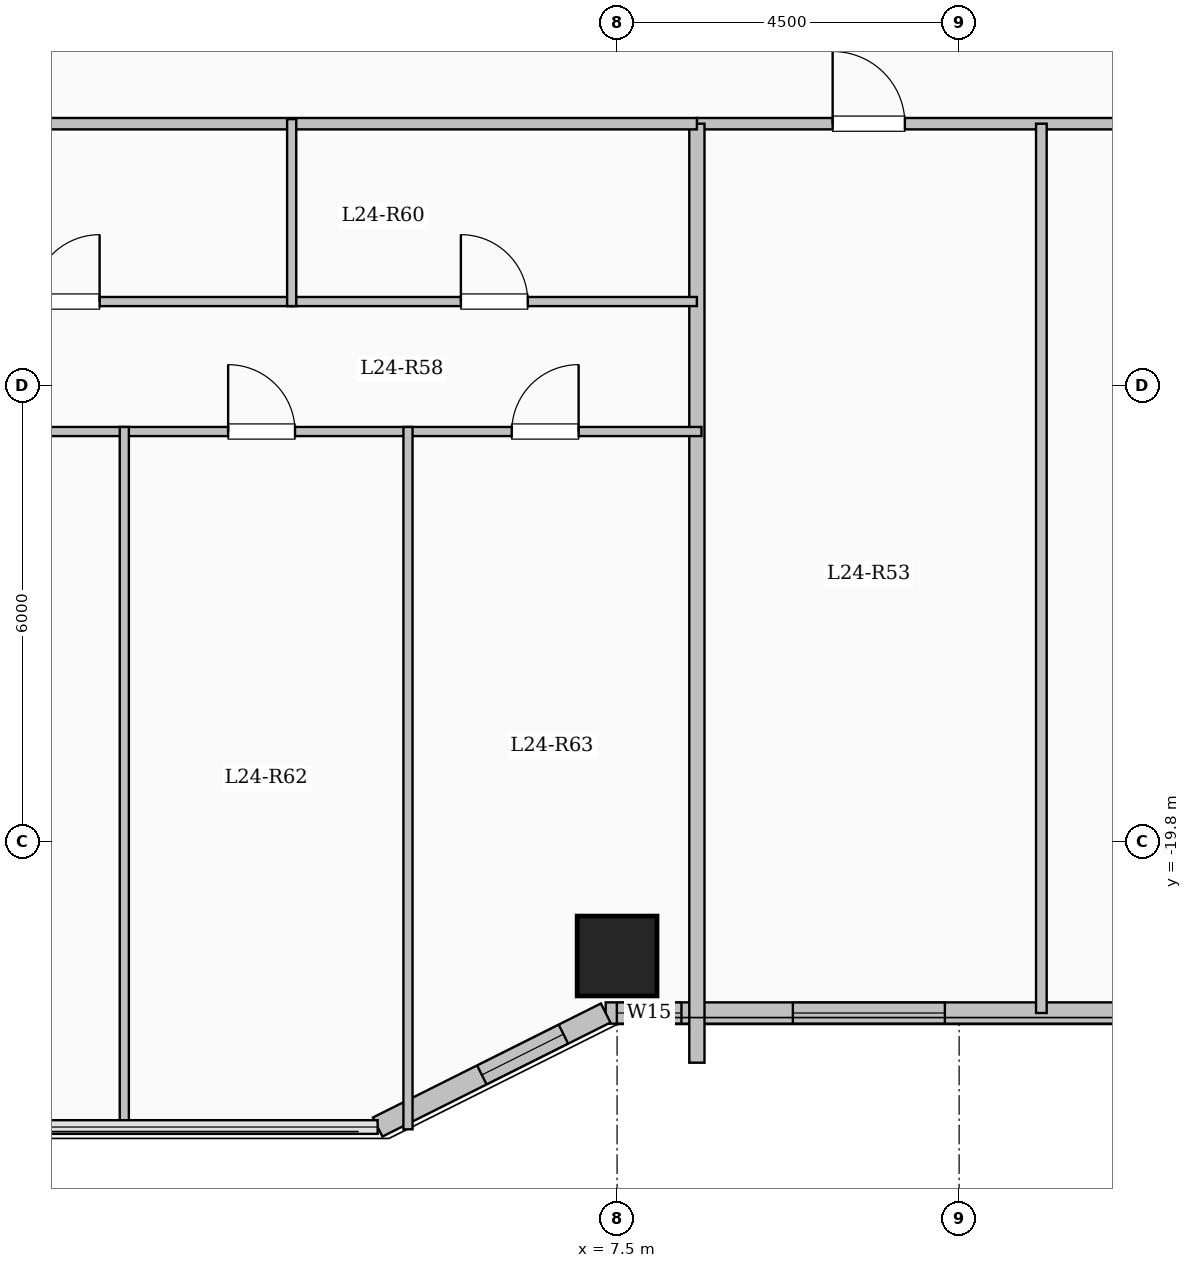
"""IFC4 building model, lengths in metres.
Left out: names, types, materials, properties, quantities, classifications, styles, units other than length and angle.
Written with IfcOpenShell. Run it as: python <this file> out.ifc"""

import sys

from ifc_helpers import new_model, si_unit, direction, frame, frame_2d, origin, origin_2d, place, context, subcontext, project, spatial, rectangle, extrude, element, fill, save


model = new_model("IFC4")
c1 = context("Model", 3, precision=1e-05, world=origin(), true_north=direction((0.0, 1.0)))
c2 = subcontext(c1, "Body", "Model", "MODEL_VIEW")
j1 = project(units=[si_unit("LENGTHUNIT", "METRE"), si_unit("PLANEANGLEUNIT", "RADIAN")], contexts=[c1])
p1 = place(None, origin())
s1 = spatial("IfcSite", under=j1, at=p1, CompositionType="ELEMENT")
p2 = place(p1, origin())
s2 = spatial("IfcBuilding", under=s1, at=p2, CompositionType="ELEMENT")
p3 = place(p2, frame((0.0, 0.0, 91.7)))
s3 = spatial("IfcBuildingStorey", under=s2, at=p3, CompositionType="ELEMENT", Elevation=91.7)
p4 = place(p3, frame((7.5, -21.3, 0.0), z_axis=(0.0, 0.0, 1.0), x_axis=(1.0, 0.0, 0.0)))
e1 = element("IfcColumn", 1, at=p4, inside=s3, PredefinedType="COLUMN", context=c2, shape_type="SweptSolid", body=[
    extrude(rectangle(XDim=1.05, YDim=1.05, at=origin_2d()), origin(), (0.0, 0.0, 1.0), 3.35),
])
p5 = place(p3, frame((21.15, -22.05, 0.0), z_axis=(0.0, 0.0, 1.0), x_axis=(-1.0, 0.0, 0.0)))
e2 = element("IfcWall", 2, at=p5, inside=s3, PredefinedType="SOLIDWALL", context=c2, shape_type="SweptSolid", body=[
    extrude(rectangle(XDim=13.8, YDim=0.28, at=frame_2d((6.9, 0.0))), origin(), (0.0, 0.0, 1.0), 3.1),
])
p6 = place(p5, frame((0.906, 0.0, 0.9)))
e3 = element("IfcOpeningElement", 3, at=p6, cuts=e2, PredefinedType="OPENING", context=c2, shape_type="SweptSolid", body=[
    extrude(rectangle(XDim=1.8, YDim=1.65, at=frame_2d((0.9, 0.825))), frame((0.0, 0.15, 0.0), z_axis=(0.0, -1.0, 0.0), x_axis=(1.0, 0.0, 0.0)), (0.0, 0.0, 1.0), 0.3),
])
p7 = place(p5, frame((4.821, 0.0, 0.9)))
e4 = element("IfcOpeningElement", 4, at=p7, cuts=e2, PredefinedType="OPENING", context=c2, shape_type="SweptSolid", body=[
    extrude(rectangle(XDim=2.0, YDim=1.7, at=frame_2d((1.0, 0.85))), frame((0.0, 0.15, 0.0), z_axis=(0.0, -1.0, 0.0), x_axis=(1.0, 0.0, 0.0)), (0.0, 0.0, 1.0), 0.3),
])
p8 = place(p5, frame((9.337, 0.0, 0.9)))
e5 = element("IfcOpeningElement", 5, at=p8, cuts=e2, PredefinedType="OPENING", context=c2, shape_type="SweptSolid", body=[
    extrude(rectangle(XDim=2.0, YDim=1.7, at=frame_2d((1.0, 0.85))), frame((0.0, 0.15, 0.0), z_axis=(0.0, -1.0, 0.0), x_axis=(1.0, 0.0, 0.0)), (0.0, 0.0, 1.0), 0.3),
])
p9 = place(p5, frame((12.803, 0.0, 0.95)))
e6 = element("IfcOpeningElement", 6, at=p9, cuts=e2, PredefinedType="OPENING", context=c2, shape_type="SweptSolid", body=[
    extrude(rectangle(XDim=0.85, YDim=1.5, at=frame_2d((0.425, 0.75))), frame((0.0, 0.15, 0.0), z_axis=(0.0, -1.0, 0.0), x_axis=(1.0, 0.0, 0.0)), (0.0, 0.0, 1.0), 0.3),
])
p10 = place(p3, frame((7.35, -22.05, 0.0), z_axis=(0.0, 0.0, 1.0), x_axis=(-0.894427191, -0.4472135955, 0.0)))
e7 = element("IfcWall", 7, at=p10, inside=s3, PredefinedType="SOLIDWALL", context=c2, shape_type="SweptSolid", body=[
    extrude(rectangle(XDim=3.354, YDim=0.28, at=frame_2d((1.677, 0.0))), origin(), (0.0, 0.0, 1.0), 3.1),
])
p11 = place(p10, frame((0.622, 0.0, 0.95)))
e8 = element("IfcOpeningElement", 8, at=p11, cuts=e7, PredefinedType="OPENING", context=c2, shape_type="SweptSolid", body=[
    extrude(rectangle(XDim=1.2, YDim=1.5, at=frame_2d((0.6, 0.75))), frame((0.0, 0.15, 0.0), z_axis=(0.0, -1.0, 0.0), x_axis=(1.0, 0.0, 0.0)), (0.0, 0.0, 1.0), 0.3),
])
p12 = place(p3, frame((8.55, -10.35, 0.0), z_axis=(0.0, 0.0, 1.0), x_axis=(1.0, 0.0, 0.0)))
e9 = element("IfcWall", 9, at=p12, inside=s3, PredefinedType="PARTITIONING", context=c2, shape_type="SweptSolid", body=[
    extrude(rectangle(XDim=12.5, YDim=0.15, at=frame_2d((6.25, 0.0))), origin(), (0.0, 0.0, 1.0), 3.1),
])
p13 = place(p12, frame((1.786, 0.0, 0.0)))
e10 = element("IfcOpeningElement", 10, at=p13, cuts=e9, PredefinedType="OPENING", context=c2, shape_type="SweptSolid", body=[
    extrude(rectangle(XDim=0.95, YDim=2.15, at=frame_2d((0.475, 1.075))), frame((0.0, 0.085, 0.0), z_axis=(0.0, -1.0, 0.0), x_axis=(1.0, 0.0, 0.0)), (0.0, 0.0, 1.0), 0.17),
])
p14 = place(p12, frame((6.298, 0.0, 0.0)))
e11 = element("IfcOpeningElement", 11, at=p14, cuts=e9, PredefinedType="OPENING", context=c2, shape_type="SweptSolid", body=[
    extrude(rectangle(XDim=0.95, YDim=2.15, at=frame_2d((0.475, 1.075))), frame((0.0, 0.085, 0.0), z_axis=(0.0, -1.0, 0.0), x_axis=(1.0, 0.0, 0.0)), (0.0, 0.0, 1.0), 0.17),
])
p15 = place(p12, frame((10.312, 0.0, 0.0)))
e12 = element("IfcOpeningElement", 12, at=p15, cuts=e9, PredefinedType="OPENING", context=c2, shape_type="SweptSolid", body=[
    extrude(rectangle(XDim=0.95, YDim=2.15, at=frame_2d((0.475, 1.075))), frame((0.0, 0.085, 0.0), z_axis=(0.0, -1.0, 0.0), x_axis=(1.0, 0.0, 0.0)), (0.0, 0.0, 1.0), 0.17),
])
p16 = place(p3, frame((13.082, -22.05, 0.0), z_axis=(0.0, 0.0, 1.0), x_axis=(0.0, 1.0, 0.0)))
e13 = element("IfcWall", 13, at=p16, inside=s3, PredefinedType="PARTITIONING", context=c2, shape_type="SweptSolid", body=[
    extrude(rectangle(XDim=11.7, YDim=0.14, at=frame_2d((5.85, 0.0))), origin(), (0.0, 0.0, 1.0), 3.1),
])
p17 = place(p3, frame((8.55, -22.704, 0.0), z_axis=(0.0, 0.0, 1.0), x_axis=(0.0, 1.0, 0.0)))
e14 = element("IfcWall", 14, at=p17, inside=s3, PredefinedType="SOLIDWALL", context=c2, shape_type="SweptSolid", body=[
    extrude(rectangle(XDim=12.354, YDim=0.2, at=frame_2d((6.177, 0.0))), origin(), (0.0, 0.0, 1.0), 3.1),
])
p18 = place(p3, frame((-8.55, -10.35, 0.0), z_axis=(0.0, 0.0, 1.0), x_axis=(1.0, 0.0, 0.0)))
e15 = element("IfcWall", 15, at=p18, inside=s3, PredefinedType="PARTITIONING", context=c2, shape_type="SweptSolid", body=[
    extrude(rectangle(XDim=17.1, YDim=0.15, at=frame_2d((8.55, 0.0))), origin(), (0.0, 0.0, 1.0), 3.1),
])
p19 = place(p18, frame((1.6, 0.0, 0.0)))
e16 = element("IfcOpeningElement", 16, at=p19, cuts=e15, PredefinedType="OPENING", context=c2, shape_type="SweptSolid", body=[
    extrude(rectangle(XDim=0.96, YDim=2.15, at=frame_2d((0.48, 1.075))), frame((0.0, 0.085, 0.0), z_axis=(0.0, -1.0, 0.0), x_axis=(1.0, 0.0, 0.0)), (0.0, 0.0, 1.0), 0.17),
])
p20 = place(p3, frame((-2.714, -12.69, 0.0), z_axis=(0.0, 0.0, 1.0), x_axis=(1.0, 0.0, 0.0)))
e17 = element("IfcWall", 17, at=p20, inside=s3, PredefinedType="PARTITIONING", context=c2, shape_type="SweptSolid", body=[
    extrude(rectangle(XDim=5.933, YDim=0.12, at=frame_2d((2.967, 0.0))), origin(), (0.0, 0.0, 1.0), 2.635),
])
p21 = place(p20, frame((2.526, 0.0, 0.0)))
e18 = element("IfcOpeningElement", 18, at=p21, cuts=e17, PredefinedType="OPENING", context=c2, shape_type="SweptSolid", body=[
    extrude(rectangle(XDim=0.88, YDim=2.1, at=frame_2d((0.44, 1.05))), frame((0.0, 0.07, 0.0), z_axis=(0.0, -1.0, 0.0), x_axis=(1.0, 0.0, 0.0)), (0.0, 0.0, 1.0), 0.14),
])
p22 = place(p3, frame((3.219, -12.69, 0.0), z_axis=(0.0, 0.0, 1.0), x_axis=(1.0, 0.0, 0.0)))
e19 = element("IfcWall", 19, at=p22, inside=s3, PredefinedType="PARTITIONING", context=c2, shape_type="SweptSolid", body=[
    extrude(rectangle(XDim=5.331, YDim=0.12, at=frame_2d((2.666, 0.0))), origin(), (0.0, 0.0, 1.0), 2.635),
])
p23 = place(p22, frame((2.226, 0.0, 0.0)))
e20 = element("IfcOpeningElement", 20, at=p23, cuts=e19, PredefinedType="OPENING", context=c2, shape_type="SweptSolid", body=[
    extrude(rectangle(XDim=0.88, YDim=2.1, at=frame_2d((0.44, 1.05))), frame((0.0, 0.07, 0.0), z_axis=(0.0, -1.0, 0.0), x_axis=(1.0, 0.0, 0.0)), (0.0, 0.0, 1.0), 0.14),
])
p24 = place(p3, frame((-2.774, -14.4, 0.0), z_axis=(0.0, 0.0, 1.0), x_axis=(1.0, 0.0, 0.0)))
e21 = element("IfcWall", 21, at=p24, inside=s3, PredefinedType="PARTITIONING", context=c2, shape_type="SweptSolid", body=[
    extrude(rectangle(XDim=11.384, YDim=0.12, at=frame_2d((5.692, 0.0))), origin(), (0.0, 0.0, 1.0), 2.635),
])
p25 = place(p24, frame((1.426, 0.0, 0.0)))
e22 = element("IfcOpeningElement", 22, at=p25, cuts=e21, PredefinedType="OPENING", context=c2, shape_type="SweptSolid", body=[
    extrude(rectangle(XDim=0.88, YDim=2.1, at=frame_2d((0.44, 1.05))), frame((0.0, 0.07, 0.0), z_axis=(0.0, -1.0, 0.0), x_axis=(1.0, 0.0, 0.0)), (0.0, 0.0, 1.0), 0.14),
])
p26 = place(p24, frame((5.157, 0.0, 0.0)))
e23 = element("IfcOpeningElement", 23, at=p26, cuts=e21, PredefinedType="OPENING", context=c2, shape_type="SweptSolid", body=[
    extrude(rectangle(XDim=0.88, YDim=2.1, at=frame_2d((0.44, 1.05))), frame((0.0, 0.07, 0.0), z_axis=(0.0, -1.0, 0.0), x_axis=(1.0, 0.0, 0.0)), (0.0, 0.0, 1.0), 0.14),
])
p27 = place(p24, frame((8.888, 0.0, 0.0)))
e24 = element("IfcOpeningElement", 24, at=p27, cuts=e21, PredefinedType="OPENING", context=c2, shape_type="SweptSolid", body=[
    extrude(rectangle(XDim=0.88, YDim=2.1, at=frame_2d((0.44, 1.05))), frame((0.0, 0.07, 0.0), z_axis=(0.0, -1.0, 0.0), x_axis=(1.0, 0.0, 0.0)), (0.0, 0.0, 1.0), 0.14),
])
p28 = place(p3, frame((3.219, -12.75, 0.0), z_axis=(0.0, 0.0, 1.0), x_axis=(0.0, 1.0, 0.0)))
e25 = element("IfcWall", 25, at=p28, inside=s3, PredefinedType="PARTITIONING", context=c2, shape_type="SweptSolid", body=[
    extrude(rectangle(XDim=2.46, YDim=0.12, at=frame_2d((1.23, 0.0))), origin(), (0.0, 0.0, 1.0), 3.1),
])
for number, where, z_axis, x_axis in (
    (26, (1.017, -23.58, 0.0), (0.0, 0.0, 1.0), (0.0, 1.0, 0.0)),
    (27, (4.749, -23.58, 0.0), (0.0, 0.0, 1.0), (0.0, 1.0, 0.0)),
):
    element("IfcWall", number, at=place(p3, frame(where, z_axis=z_axis, x_axis=x_axis)), inside=s3, PredefinedType="PARTITIONING", context=c2, shape_type="SweptSolid", body=[
        extrude(rectangle(XDim=9.24, YDim=0.12, at=frame_2d((4.62, 0.0))), origin(), (0.0, 0.0, 1.0), 3.1),
    ])
p29 = place(p8, origin())
e28 = element("IfcWindow", 28, at=p29, inside=s3, PartitioningType="SINGLE_PANEL", PredefinedType="WINDOW", context=c2, shape_type="SweptSolid", body=[
    extrude(rectangle(XDim=2.0, YDim=1.7, at=frame_2d((1.0, 0.85))), frame((0.0, 0.03, 0.0), z_axis=(0.0, -1.0, 0.0), x_axis=(1.0, 0.0, 0.0)), (0.0, 0.0, 1.0), 0.06),
])
fill(e5, e28)
p30 = place(p9, origin())
e29 = element("IfcWindow", 29, at=p30, inside=s3, PartitioningType="SINGLE_PANEL", PredefinedType="WINDOW", context=c2, shape_type="SweptSolid", body=[
    extrude(rectangle(XDim=0.85, YDim=1.5, at=frame_2d((0.425, 0.75))), frame((0.0, 0.03, 0.0), z_axis=(0.0, -1.0, 0.0), x_axis=(1.0, 0.0, 0.0)), (0.0, 0.0, 1.0), 0.06),
])
fill(e6, e29)
p31 = place(p11, origin())
e30 = element("IfcWindow", 30, at=p31, inside=s3, PartitioningType="SINGLE_PANEL", PredefinedType="WINDOW", context=c2, shape_type="SweptSolid", body=[
    extrude(rectangle(XDim=1.2, YDim=1.5, at=frame_2d((0.6, 0.75))), frame((0.0, 0.03, 0.0), z_axis=(0.0, -1.0, 0.0), x_axis=(1.0, 0.0, 0.0)), (0.0, 0.0, 1.0), 0.06),
])
fill(e8, e30)
p32 = place(p13, origin())
e31 = element("IfcDoor", 31, at=p32, inside=s3, OperationType="SINGLE_SWING_LEFT", PredefinedType="DOOR", context=c2, shape_type="SweptSolid", body=[
    extrude(rectangle(XDim=0.95, YDim=2.15, at=frame_2d((0.475, 1.075))), frame((0.0, 0.025, 0.0), z_axis=(0.0, -1.0, 0.0), x_axis=(1.0, 0.0, 0.0)), (0.0, 0.0, 1.0), 0.05),
])
fill(e10, e31)
p33 = place(p21, origin())
e32 = element("IfcDoor", 32, at=p33, inside=s3, OperationType="SINGLE_SWING_RIGHT", PredefinedType="DOOR", context=c2, shape_type="SweptSolid", body=[
    extrude(rectangle(XDim=0.88, YDim=2.1, at=frame_2d((0.44, 1.05))), frame((0.0, 0.025, 0.0), z_axis=(0.0, -1.0, 0.0), x_axis=(1.0, 0.0, 0.0)), (0.0, 0.0, 1.0), 0.05),
])
fill(e18, e32)
p34 = place(p23, origin())
e33 = element("IfcDoor", 33, at=p34, inside=s3, OperationType="SINGLE_SWING_LEFT", PredefinedType="DOOR", context=c2, shape_type="SweptSolid", body=[
    extrude(rectangle(XDim=0.88, YDim=2.1, at=frame_2d((0.44, 1.05))), frame((0.0, 0.025, 0.0), z_axis=(0.0, -1.0, 0.0), x_axis=(1.0, 0.0, 0.0)), (0.0, 0.0, 1.0), 0.05),
])
fill(e20, e33)
p35 = place(p26, origin())
e34 = element("IfcDoor", 34, at=p35, inside=s3, OperationType="SINGLE_SWING_LEFT", PredefinedType="DOOR", context=c2, shape_type="SweptSolid", body=[
    extrude(rectangle(XDim=0.88, YDim=2.1, at=frame_2d((0.44, 1.05))), frame((0.0, 0.025, 0.0), z_axis=(0.0, -1.0, 0.0), x_axis=(1.0, 0.0, 0.0)), (0.0, 0.0, 1.0), 0.05),
])
fill(e23, e34)
p36 = place(p27, origin())
e35 = element("IfcDoor", 35, at=p36, inside=s3, OperationType="SINGLE_SWING_RIGHT", PredefinedType="DOOR", context=c2, shape_type="SweptSolid", body=[
    extrude(rectangle(XDim=0.88, YDim=2.1, at=frame_2d((0.44, 1.05))), frame((0.0, 0.025, 0.0), z_axis=(0.0, -1.0, 0.0), x_axis=(1.0, 0.0, 0.0)), (0.0, 0.0, 1.0), 0.05),
])
fill(e24, e35)
save(model, sys.argv[1])
